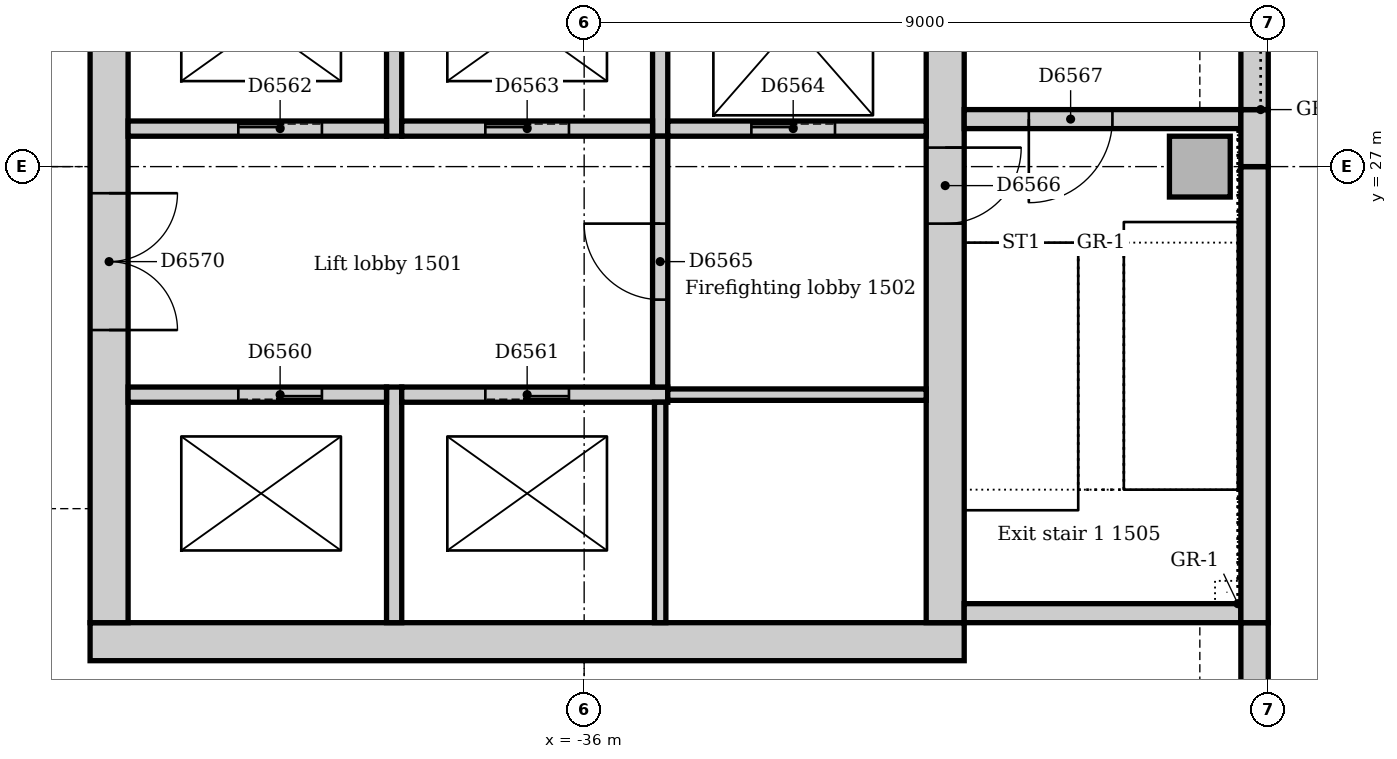
"""IFC4 building model, lengths in metres.
Left out: names, types, materials, properties, quantities, classifications, styles, units other than length and angle.
Written with IfcOpenShell. Run it as: python <this file> out.ifc"""

import sys

from ifc_helpers import new_model, si_unit, direction, frame, frame_2d, origin, origin_2d, place, context, subcontext, project, spatial, rectangle, extrude, element, fill, save


model = new_model("IFC4")
c1 = context("Model", 3, precision=1e-05, world=origin(), true_north=direction((0.0, 1.0)))
c2 = subcontext(c1, "Body", "Model", "MODEL_VIEW")
j1 = project(units=[si_unit("LENGTHUNIT", "METRE"), si_unit("PLANEANGLEUNIT", "RADIAN")], contexts=[c1])
p1 = place(None, origin())
s1 = spatial("IfcSite", under=j1, at=p1, CompositionType="ELEMENT")
p2 = place(p1, origin())
s2 = spatial("IfcBuilding", under=s1, at=p2, CompositionType="ELEMENT")
p3 = place(p2, frame((0.0, 0.0, 67.0)))
s3 = spatial("IfcBuildingStorey", under=s2, at=p3, CompositionType="ELEMENT", Elevation=67.0)
p4 = place(p3, frame((-42.5, 20.75, 0.0), z_axis=(0.0, 0.0, 1.0), x_axis=(1.0, 0.0, 0.0)))
e1 = element("IfcWall", 1, at=p4, inside=s3, PredefinedType="SOLIDWALL", context=c2, shape_type="SweptSolid", body=[
    extrude(rectangle(XDim=11.5, YDim=0.5, at=frame_2d((5.75, 0.0))), origin(), (0.0, 0.0, 1.0), 4.0),
])
p5 = place(p3, frame((-31.25, 21.0, 0.0), z_axis=(0.0, 0.0, 1.0), x_axis=(0.0, 1.0, 0.0)))
e2 = element("IfcWall", 2, at=p5, inside=s3, PredefinedType="SOLIDWALL", context=c2, shape_type="SweptSolid", body=[
    extrude(rectangle(XDim=9.5, YDim=0.5, at=frame_2d((4.75, 0.0))), origin(), (0.0, 0.0, 1.0), 4.0),
])
p6 = place(p5, frame((5.25, 0.0, 0.0)))
e3 = element("IfcOpeningElement", 3, at=p6, cuts=e2, PredefinedType="OPENING", context=c2, shape_type="SweptSolid", body=[
    extrude(rectangle(XDim=1.0, YDim=2.1, at=frame_2d((0.5, 1.05))), frame((0.0, 0.26, 0.0), z_axis=(0.0, -1.0, 0.0), x_axis=(1.0, 0.0, 0.0)), (0.0, 0.0, 1.0), 0.52),
])
p7 = place(p3, frame((-42.25, 30.5, 0.0), z_axis=(0.0, 0.0, 1.0), x_axis=(0.0, -1.0, 0.0)))
e4 = element("IfcWall", 4, at=p7, inside=s3, PredefinedType="SOLIDWALL", context=c2, shape_type="SweptSolid", body=[
    extrude(rectangle(XDim=9.5, YDim=0.5, at=frame_2d((4.75, 0.0))), origin(), (0.0, 0.0, 1.0), 4.0),
])
p8 = place(p7, frame((3.85, 0.0, 0.0)))
e5 = element("IfcOpeningElement", 5, at=p8, cuts=e4, PredefinedType="OPENING", context=c2, shape_type="SweptSolid", body=[
    extrude(rectangle(XDim=1.8, YDim=2.1, at=frame_2d((0.9, 1.05))), frame((0.0, 0.26, 0.0), z_axis=(0.0, -1.0, 0.0), x_axis=(1.0, 0.0, 0.0)), (0.0, 0.0, 1.0), 0.52),
])
p9 = place(p3, frame((-31.0, 21.125, 0.0), z_axis=(0.0, 0.0, 1.0), x_axis=(1.0, 0.0, 0.0)))
e6 = element("IfcWall", 6, at=p9, inside=s3, PredefinedType="SOLIDWALL", context=c2, shape_type="SweptSolid", body=[
    extrude(rectangle(XDim=3.64, YDim=0.25, at=frame_2d((1.82, 0.0))), origin(), (0.0, 0.0, 1.0), 4.0),
])
p10 = place(p3, frame((-27.36, 27.625, 0.0), z_axis=(0.0, 0.0, 1.0), x_axis=(-1.0, 0.0, 0.0)))
e7 = element("IfcWall", 7, at=p10, inside=s3, PredefinedType="SOLIDWALL", context=c2, shape_type="SweptSolid", body=[
    extrude(rectangle(XDim=3.64, YDim=0.25, at=frame_2d((1.82, 0.0))), origin(), (0.0, 0.0, 1.0), 4.0),
])
p11 = place(p10, frame((1.69, 0.0, 0.0)))
e8 = element("IfcOpeningElement", 8, at=p11, cuts=e7, PredefinedType="OPENING", context=c2, shape_type="SweptSolid", body=[
    extrude(rectangle(XDim=1.1, YDim=2.1, at=frame_2d((0.55, 1.05))), frame((0.0, 0.135, 0.0), z_axis=(0.0, -1.0, 0.0), x_axis=(1.0, 0.0, 0.0)), (0.0, 0.0, 1.0), 0.27),
])
p12 = place(p3, frame((-27.9, 27.0, 0.0), z_axis=(0.0, 0.0, 1.0), x_axis=(1.0, 0.0, 0.0)))
e9 = element("IfcColumn", 9, at=p12, inside=s3, PredefinedType="COLUMN", context=c2, shape_type="SweptSolid", body=[
    extrude(rectangle(XDim=0.8, YDim=0.8, at=origin_2d()), origin(), (0.0, 0.0, 1.0), 4.0),
])
p13 = place(p3, frame((-27.18, 13.243, 0.0), z_axis=(0.0, 0.0, 1.0), x_axis=(0.0, 1.0, 0.0)))
e10 = element("IfcWall", 10, at=p13, inside=s3, PredefinedType="STANDARD", context=c2, shape_type="SweptSolid", body=[
    extrude(rectangle(XDim=7.757, YDim=0.36, at=frame_2d((3.879, 0.0))), origin(), (0.0, 0.0, 1.0), 3.85),
])
p14 = place(p13, frame((1.982, 0.0, 0.9)))
e11 = element("IfcOpeningElement", 11, at=p14, cuts=e10, PredefinedType="OPENING", context=c2, shape_type="SweptSolid", body=[
    extrude(rectangle(XDim=3.3, YDim=1.6, at=frame_2d((1.65, 0.8))), frame((0.0, 0.19, 0.0), z_axis=(0.0, -1.0, 0.0), x_axis=(1.0, 0.0, 0.0)), (0.0, 0.0, 1.0), 0.38),
])
p15 = place(p3, frame((-27.18, 21.0, 0.0), z_axis=(0.0, 0.0, 1.0), x_axis=(0.0, 1.0, 0.0)))
e12 = element("IfcWall", 12, at=p15, inside=s3, PredefinedType="STANDARD", context=c2, shape_type="SweptSolid", body=[
    extrude(rectangle(XDim=6.0, YDim=0.36, at=frame_2d((3.0, 0.0))), origin(), (0.0, 0.0, 1.0), 3.85),
])
p16 = place(p3, frame((-27.18, 27.0, 0.0), z_axis=(0.0, 0.0, 1.0), x_axis=(0.0, 1.0, 0.0)))
e13 = element("IfcWall", 13, at=p16, inside=s3, PredefinedType="STANDARD", context=c2, shape_type="SweptSolid", body=[
    extrude(rectangle(XDim=0.75, YDim=0.36, at=frame_2d((0.375, 0.0))), origin(), (0.0, 0.0, 1.0), 3.436),
])
p17 = place(p3, frame((-27.18, 27.75, 0.0), z_axis=(0.0, 0.0, 1.0), x_axis=(0.0, 1.0, 0.0)))
e14 = element("IfcWall", 14, at=p17, inside=s3, PredefinedType="STANDARD", context=c2, shape_type="SweptSolid", body=[
    extrude(rectangle(XDim=7.5, YDim=0.36, at=frame_2d((3.75, 0.0))), origin(), (0.0, 0.0, 1.0), 3.436),
])
p18 = place(p17, frame((2.85, 0.0, 1.2)))
e15 = element("IfcOpeningElement", 15, at=p18, cuts=e14, PredefinedType="OPENING", context=c2, shape_type="SweptSolid", body=[
    extrude(rectangle(XDim=1.8, YDim=1.2, at=frame_2d((0.9, 0.6))), frame((0.0, 0.19, 0.0), z_axis=(0.0, -1.0, 0.0), x_axis=(1.0, 0.0, 0.0)), (0.0, 0.0, 1.0), 0.38),
])
p19 = place(p3, frame((-38.5, 21.0, 0.0), z_axis=(0.0, 0.0, 1.0), x_axis=(0.0, 1.0, 0.0)))
e16 = element("IfcWall", 16, at=p19, inside=s3, PredefinedType="SOLIDWALL", context=c2, shape_type="SweptSolid", body=[
    extrude(rectangle(XDim=3.1, YDim=0.2, at=frame_2d((1.55, 0.0))), origin(), (0.0, 0.0, 1.0), 4.0),
])
p20 = place(p3, frame((-38.6, 24.0, 0.0), z_axis=(0.0, 0.0, 1.0), x_axis=(-1.0, 0.0, 0.0)))
e17 = element("IfcWall", 17, at=p20, inside=s3, PredefinedType="SOLIDWALL", context=c2, shape_type="SweptSolid", body=[
    extrude(rectangle(XDim=3.4, YDim=0.2, at=frame_2d((1.7, 0.0))), origin(), (0.0, 0.0, 1.0), 4.0),
])
p21 = place(p20, frame((0.85, 0.0, 0.0)))
e18 = element("IfcOpeningElement", 18, at=p21, cuts=e17, PredefinedType="OPENING", context=c2, shape_type="SweptSolid", body=[
    extrude(rectangle(XDim=1.1, YDim=2.1, at=frame_2d((0.55, 1.05))), frame((0.0, 0.11, 0.0), z_axis=(0.0, -1.0, 0.0), x_axis=(1.0, 0.0, 0.0)), (0.0, 0.0, 1.0), 0.22),
])
p22 = place(p3, frame((-34.9, 24.0, 0.0), z_axis=(0.0, 0.0, 1.0), x_axis=(-1.0, 0.0, 0.0)))
e19 = element("IfcWall", 19, at=p22, inside=s3, PredefinedType="SOLIDWALL", context=c2, shape_type="SweptSolid", body=[
    extrude(rectangle(XDim=3.5, YDim=0.2, at=frame_2d((1.75, 0.0))), origin(), (0.0, 0.0, 1.0), 4.0),
])
p23 = place(p22, frame((1.3, 0.0, 0.0)))
e20 = element("IfcOpeningElement", 20, at=p23, cuts=e19, PredefinedType="OPENING", context=c2, shape_type="SweptSolid", body=[
    extrude(rectangle(XDim=1.1, YDim=2.1, at=frame_2d((0.55, 1.05))), frame((0.0, 0.11, 0.0), z_axis=(0.0, -1.0, 0.0), x_axis=(1.0, 0.0, 0.0)), (0.0, 0.0, 1.0), 0.22),
])
p24 = place(p3, frame((-38.5, 27.4, 0.0), z_axis=(0.0, 0.0, 1.0), x_axis=(0.0, 1.0, 0.0)))
e21 = element("IfcWall", 21, at=p24, inside=s3, PredefinedType="SOLIDWALL", context=c2, shape_type="SweptSolid", body=[
    extrude(rectangle(XDim=2.85, YDim=0.2, at=frame_2d((1.425, 0.0))), origin(), (0.0, 0.0, 1.0), 4.0),
])
p25 = place(p3, frame((-42.0, 27.5, 0.0), z_axis=(0.0, 0.0, 1.0), x_axis=(1.0, 0.0, 0.0)))
e22 = element("IfcWall", 22, at=p25, inside=s3, PredefinedType="SOLIDWALL", context=c2, shape_type="SweptSolid", body=[
    extrude(rectangle(XDim=3.4, YDim=0.2, at=frame_2d((1.7, 0.0))), origin(), (0.0, 0.0, 1.0), 4.0),
])
p26 = place(p25, frame((1.45, 0.0, 0.0)))
e23 = element("IfcOpeningElement", 23, at=p26, cuts=e22, PredefinedType="OPENING", context=c2, shape_type="SweptSolid", body=[
    extrude(rectangle(XDim=1.1, YDim=2.1, at=frame_2d((0.55, 1.05))), frame((0.0, 0.11, 0.0), z_axis=(0.0, -1.0, 0.0), x_axis=(1.0, 0.0, 0.0)), (0.0, 0.0, 1.0), 0.22),
])
p27 = place(p3, frame((-35.0, 27.4, 0.0), z_axis=(0.0, 0.0, 1.0), x_axis=(0.0, 1.0, 0.0)))
e24 = element("IfcWall", 24, at=p27, inside=s3, PredefinedType="SOLIDWALL", context=c2, shape_type="SweptSolid", body=[
    extrude(rectangle(XDim=2.85, YDim=0.2, at=frame_2d((1.425, 0.0))), origin(), (0.0, 0.0, 1.0), 4.0),
])
p28 = place(p3, frame((-38.4, 27.5, 0.0), z_axis=(0.0, 0.0, 1.0), x_axis=(1.0, 0.0, 0.0)))
e25 = element("IfcWall", 25, at=p28, inside=s3, PredefinedType="SOLIDWALL", context=c2, shape_type="SweptSolid", body=[
    extrude(rectangle(XDim=3.3, YDim=0.2, at=frame_2d((1.65, 0.0))), origin(), (0.0, 0.0, 1.0), 4.0),
])
p29 = place(p28, frame((1.1, 0.0, 0.0)))
e26 = element("IfcOpeningElement", 26, at=p29, cuts=e25, PredefinedType="OPENING", context=c2, shape_type="SweptSolid", body=[
    extrude(rectangle(XDim=1.1, YDim=2.1, at=frame_2d((0.55, 1.05))), frame((0.0, 0.11, 0.0), z_axis=(0.0, -1.0, 0.0), x_axis=(1.0, 0.0, 0.0)), (0.0, 0.0, 1.0), 0.22),
])
p30 = place(p3, frame((-34.9, 27.5, 0.0), z_axis=(0.0, 0.0, 1.0), x_axis=(1.0, 0.0, 0.0)))
e27 = element("IfcWall", 27, at=p30, inside=s3, PredefinedType="SOLIDWALL", context=c2, shape_type="SweptSolid", body=[
    extrude(rectangle(XDim=3.4, YDim=0.2, at=frame_2d((1.7, 0.0))), origin(), (0.0, 0.0, 1.0), 4.0),
])
p31 = place(p30, frame((1.1, 0.0, 0.0)))
e28 = element("IfcOpeningElement", 28, at=p31, cuts=e27, PredefinedType="OPENING", context=c2, shape_type="SweptSolid", body=[
    extrude(rectangle(XDim=1.1, YDim=2.1, at=frame_2d((0.55, 1.05))), frame((0.0, 0.11, 0.0), z_axis=(0.0, -1.0, 0.0), x_axis=(1.0, 0.0, 0.0)), (0.0, 0.0, 1.0), 0.22),
])
p32 = place(p3, frame((-35.0, 24.1, 0.0), z_axis=(0.0, 0.0, 1.0), x_axis=(0.0, 1.0, 0.0)))
e29 = element("IfcWall", 29, at=p32, inside=s3, PredefinedType="SOLIDWALL", context=c2, shape_type="SweptSolid", body=[
    extrude(rectangle(XDim=3.3, YDim=0.2, at=frame_2d((1.65, 0.0))), origin(), (0.0, 0.0, 1.0), 4.0),
])
p33 = place(p32, frame((1.15, 0.0, 0.0)))
e30 = element("IfcOpeningElement", 30, at=p33, cuts=e29, PredefinedType="OPENING", context=c2, shape_type="SweptSolid", body=[
    extrude(rectangle(XDim=1.0, YDim=2.1, at=frame_2d((0.5, 1.05))), frame((0.0, 0.11, 0.0), z_axis=(0.0, -1.0, 0.0), x_axis=(1.0, 0.0, 0.0)), (0.0, 0.0, 1.0), 0.22),
])
p34 = place(p3, frame((-35.0, 21.0, 0.0), z_axis=(0.0, 0.0, 1.0), x_axis=(0.0, 1.0, 0.0)))
e31 = element("IfcWall", 31, at=p34, inside=s3, PredefinedType="SOLIDWALL", context=c2, shape_type="SweptSolid", body=[
    extrude(rectangle(XDim=2.9, YDim=0.15, at=frame_2d((1.45, 0.0))), origin(), (0.0, 0.0, 1.0), 4.0),
])
p35 = place(p3, frame((-31.5, 24.0, 0.0), z_axis=(0.0, 0.0, 1.0), x_axis=(-1.0, 0.0, 0.0)))
e32 = element("IfcWall", 32, at=p35, inside=s3, PredefinedType="SOLIDWALL", context=c2, shape_type="SweptSolid", body=[
    extrude(rectangle(XDim=3.4, YDim=0.15, at=frame_2d((1.7, 0.0))), origin(), (0.0, 0.0, 1.0), 4.0),
])
p36 = place(p21, origin())
e33 = element("IfcDoor", 33, at=p36, inside=s3, OperationType="SLIDING_TO_LEFT", PredefinedType="DOOR", context=c2, shape_type="SweptSolid", body=[
    extrude(rectangle(XDim=1.1, YDim=2.1, at=frame_2d((0.55, 1.05))), frame((0.0, 0.025, 0.0), z_axis=(0.0, -1.0, 0.0), x_axis=(1.0, 0.0, 0.0)), (0.0, 0.0, 1.0), 0.05),
])
fill(e18, e33)
p37 = place(p23, origin())
e34 = element("IfcDoor", 34, at=p37, inside=s3, OperationType="SLIDING_TO_LEFT", PredefinedType="DOOR", context=c2, shape_type="SweptSolid", body=[
    extrude(rectangle(XDim=1.1, YDim=2.1, at=frame_2d((0.55, 1.05))), frame((0.0, 0.025, 0.0), z_axis=(0.0, -1.0, 0.0), x_axis=(1.0, 0.0, 0.0)), (0.0, 0.0, 1.0), 0.05),
])
fill(e20, e34)
p38 = place(p26, origin())
e35 = element("IfcDoor", 35, at=p38, inside=s3, OperationType="SLIDING_TO_LEFT", PredefinedType="DOOR", context=c2, shape_type="SweptSolid", body=[
    extrude(rectangle(XDim=1.1, YDim=2.1, at=frame_2d((0.55, 1.05))), frame((0.0, 0.025, 0.0), z_axis=(0.0, -1.0, 0.0), x_axis=(1.0, 0.0, 0.0)), (0.0, 0.0, 1.0), 0.05),
])
fill(e23, e35)
p39 = place(p29, origin())
e36 = element("IfcDoor", 36, at=p39, inside=s3, OperationType="SLIDING_TO_LEFT", PredefinedType="DOOR", context=c2, shape_type="SweptSolid", body=[
    extrude(rectangle(XDim=1.1, YDim=2.1, at=frame_2d((0.55, 1.05))), frame((0.0, 0.025, 0.0), z_axis=(0.0, -1.0, 0.0), x_axis=(1.0, 0.0, 0.0)), (0.0, 0.0, 1.0), 0.05),
])
fill(e26, e36)
p40 = place(p31, origin())
e37 = element("IfcDoor", 37, at=p40, inside=s3, OperationType="SLIDING_TO_LEFT", PredefinedType="DOOR", context=c2, shape_type="SweptSolid", body=[
    extrude(rectangle(XDim=1.1, YDim=2.1, at=frame_2d((0.55, 1.05))), frame((0.0, 0.025, 0.0), z_axis=(0.0, -1.0, 0.0), x_axis=(1.0, 0.0, 0.0)), (0.0, 0.0, 1.0), 0.05),
])
fill(e28, e37)
p41 = place(p33, origin())
e38 = element("IfcDoor", 38, at=p41, inside=s3, OperationType="SINGLE_SWING_RIGHT", PredefinedType="DOOR", context=c2, shape_type="SweptSolid", body=[
    extrude(rectangle(XDim=1.0, YDim=2.1, at=frame_2d((0.5, 1.05))), frame((0.0, 0.025, 0.0), z_axis=(0.0, -1.0, 0.0), x_axis=(1.0, 0.0, 0.0)), (0.0, 0.0, 1.0), 0.05),
])
fill(e30, e38)
p42 = place(p6, frame((1.0, 0.0, 0.0), z_axis=(0.0, 0.0, 1.0), x_axis=(-1.0, 0.0, 0.0)))
e39 = element("IfcDoor", 39, at=p42, inside=s3, OperationType="SINGLE_SWING_LEFT", PredefinedType="DOOR", context=c2, shape_type="SweptSolid", body=[
    extrude(rectangle(XDim=1.0, YDim=2.1, at=frame_2d((0.5, 1.05))), frame((0.0, 0.025, 0.0), z_axis=(0.0, -1.0, 0.0), x_axis=(1.0, 0.0, 0.0)), (0.0, 0.0, 1.0), 0.05),
])
fill(e3, e39)
p43 = place(p11, origin())
e40 = element("IfcDoor", 40, at=p43, inside=s3, OperationType="SINGLE_SWING_RIGHT", PredefinedType="DOOR", context=c2, shape_type="SweptSolid", body=[
    extrude(rectangle(XDim=1.1, YDim=2.1, at=frame_2d((0.55, 1.05))), frame((0.0, 0.025, 0.0), z_axis=(0.0, -1.0, 0.0), x_axis=(1.0, 0.0, 0.0)), (0.0, 0.0, 1.0), 0.05),
])
fill(e8, e40)
p44 = place(p8, origin())
e41 = element("IfcDoor", 41, at=p44, inside=s3, OperationType="DOUBLE_DOOR_SINGLE_SWING", PredefinedType="DOOR", context=c2, shape_type="SweptSolid", body=[
    extrude(rectangle(XDim=1.8, YDim=2.1, at=frame_2d((0.9, 1.05))), frame((0.0, 0.025, 0.0), z_axis=(0.0, -1.0, 0.0), x_axis=(1.0, 0.0, 0.0)), (0.0, 0.0, 1.0), 0.05),
])
fill(e5, e41)
save(model, sys.argv[1])
